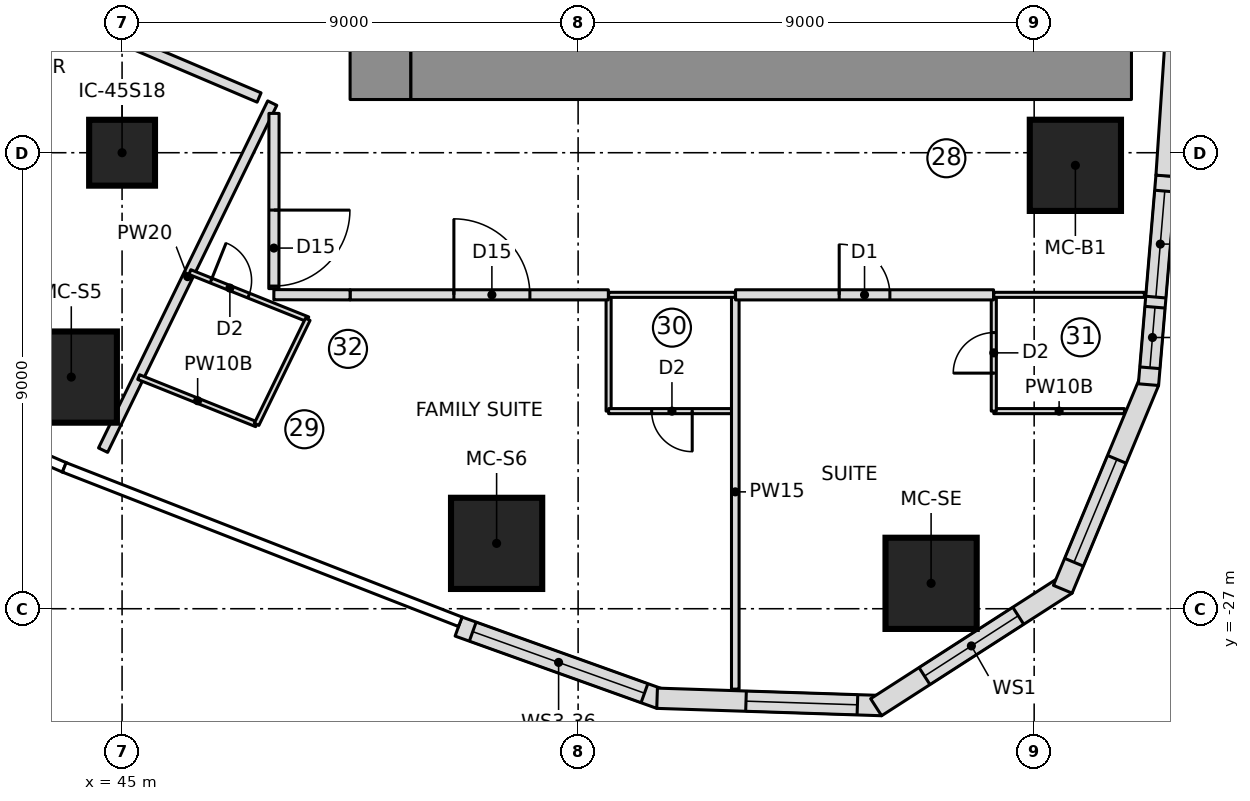
"""IFC4 building model, lengths in metres.
Left out: names, types, materials, properties, quantities, classifications, styles, units other than length and angle.
Written with IfcOpenShell. Run it as: python <this file> out.ifc"""

import sys

from ifc_helpers import new_model, si_unit, direction, frame, frame_2d, origin, origin_2d, place, context, subcontext, project, spatial, polyline, rectangle, outline, extrude, element, fill, save


model = new_model("IFC4")
c1 = context("Model", 3, precision=1e-05, world=origin(), true_north=direction((0.0, 1.0)))
c2 = subcontext(c1, "Body", "Model", "MODEL_VIEW")
j1 = project(units=[si_unit("LENGTHUNIT", "METRE"), si_unit("PLANEANGLEUNIT", "RADIAN")], contexts=[c1])
p1 = place(None, origin())
s1 = spatial("IfcSite", under=j1, at=p1, CompositionType="ELEMENT")
p2 = place(p1, origin())
s2 = spatial("IfcBuilding", under=s1, at=p2, CompositionType="ELEMENT")
p3 = place(p2, frame((0.0, 0.0, 53.8)))
s3 = spatial("IfcBuildingStorey", under=s2, at=p3, CompositionType="ELEMENT", Elevation=53.8)
p4 = place(p3, frame((50.1, -16.95, 0.0), z_axis=(0.0, 0.0, 1.0), x_axis=(0.0, 1.0, 0.0)))
e1 = element("IfcWall", 1, at=p4, inside=s3, PredefinedType="SHEAR", context=c2, shape_type="SweptSolid", body=[
    extrude(rectangle(XDim=10.3, YDim=1.2, at=frame_2d((5.15, 0.0))), origin(), (0.0, 0.0, 1.0), 3.55),
])
p5 = place(p4, frame((2.7, 0.0, 0.0)))
e2 = element("IfcOpeningElement", 2, at=p5, cuts=e1, PredefinedType="OPENING", context=c2, shape_type="SweptSolid", body=[
    extrude(rectangle(XDim=1.1, YDim=2.1, at=frame_2d((0.55, 1.05))), frame((0.0, 0.61, 0.0), z_axis=(0.0, -1.0, 0.0), x_axis=(1.0, 0.0, 0.0)), (0.0, 0.0, 1.0), 1.22),
])
p6 = place(p3, frame((50.7, -16.35, 0.0), z_axis=(0.0, 0.0, 1.0), x_axis=(1.0, 0.0, 0.0)))
e3 = element("IfcWall", 3, at=p6, inside=s3, PredefinedType="SHEAR", context=c2, shape_type="SweptSolid", body=[
    extrude(rectangle(XDim=14.22, YDim=1.2, at=frame_2d((7.11, 0.0))), origin(), (0.0, 0.0, 1.0), 3.55),
])
for number, where, z_axis, x_axis in (
    (4, (43.998, -22.428, 0.0), (0.0, 0.0, 1.0), (1.0, 0.0, 0.0)),
    (5, (52.392, -25.71, 0.0), (0.0, 0.0, 1.0), (1.0, 0.0, 0.0)),
    (6, (60.966, -26.499, 0.0), (0.0, 0.0, 1.0), (1.0, 0.0, 0.0)),
    (7, (63.813, -18.249, 0.0), (0.0, 0.0, 1.0), (1.0, 0.0, 0.0)),
):
    element("IfcColumn", number, at=place(p3, frame(where, z_axis=z_axis, x_axis=x_axis)), inside=s3, PredefinedType="COLUMN", context=c2, shape_type="SweptSolid", body=[
        extrude(rectangle(XDim=1.8, YDim=1.8, at=origin_2d()), origin(), (0.0, 0.0, 1.0), 3.55),
    ])
p7 = place(p3, frame((45.0, -18.0, 0.0), z_axis=(0.0, 0.0, 1.0), x_axis=(1.0, 0.0, 0.0)))
e8 = element("IfcColumn", 8, at=p7, inside=s3, PredefinedType="COLUMN", context=c2, shape_type="SweptSolid", body=[
    extrude(rectangle(XDim=1.3, YDim=1.3, at=origin_2d()), origin(), (0.0, 0.0, 1.0), 3.55),
])
p8 = place(p3, frame((51.64, -27.352, 0.0), z_axis=(0.0, 0.0, 1.0), x_axis=(0.941339752885, -0.337460323057, 0.0)))
e9 = element("IfcWall", 9, at=p8, inside=s3, PredefinedType="NOTDEFINED", context=c2, shape_type="SweptSolid", body=[
    extrude(outline(polyline([(0.0, -0.2), (4.228, -0.2), (4.165, 0.2), (0.0, 0.2), (0.0, -0.2)])), origin(), (0.0, 0.0, 1.0), 3.25),
])
p9 = place(p8, frame((0.298, 0.0, 0.9)))
e10 = element("IfcOpeningElement", 10, at=p9, cuts=e9, PredefinedType="OPENING", context=c2, shape_type="SweptSolid", body=[
    extrude(rectangle(XDim=3.6, YDim=1.8, at=frame_2d((1.8, 0.9))), frame((0.0, 0.21, 0.0), z_axis=(0.0, -1.0, 0.0), x_axis=(1.0, 0.0, 0.0)), (0.0, 0.0, 1.0), 0.42),
])
p10 = place(p3, frame((55.59, -28.768, 0.0), z_axis=(0.0, 0.0, 1.0), x_axis=(0.999463576228, -0.032749958686, 0.0)))
e11 = element("IfcWall", 11, at=p10, inside=s3, PredefinedType="NOTDEFINED", context=c2, shape_type="SweptSolid", body=[
    extrude(outline(polyline([(-0.031, -0.2), (4.409, -0.2), (4.284, 0.2), (0.031, 0.2), (-0.031, -0.2)])), origin(), (0.0, 0.0, 1.0), 3.25),
])
p11 = place(p10, frame((1.724, 0.0, 0.6)))
e12 = element("IfcOpeningElement", 12, at=p11, cuts=e11, PredefinedType="OPENING", context=c2, shape_type="SweptSolid", body=[
    extrude(outline(polyline([(0.0, 1.35), (0.084, 1.771), (0.322, 2.128), (0.679, 2.366), (1.1, 2.45), (1.521, 2.366), (1.878, 2.128), (2.116, 1.771), (2.2, 1.35), (2.2, 1.1), (2.116, 0.679), (1.878, 0.322), (1.521, 0.084), (1.1, 0.0), (0.679, 0.084), (0.322, 0.322), (0.084, 0.679), (0.0, 1.1), (0.0, 1.35)])), frame((0.0, 0.21, 0.0), z_axis=(0.0, -1.0, 0.0), x_axis=(1.0, 0.0, 0.0)), (0.0, 0.0, 1.0), 0.42),
])
p12 = place(p3, frame((59.934, -28.91, 0.0), z_axis=(0.0, 0.0, 1.0), x_axis=(0.840937468718, 0.541132307025, 0.0)))
e13 = element("IfcWall", 13, at=p12, inside=s3, PredefinedType="NOTDEFINED", context=c2, shape_type="SweptSolid", body=[
    extrude(outline(polyline([(-0.062, -0.2), (4.409, -0.2), (4.284, 0.2), (0.062, 0.2), (-0.062, -0.2)])), origin(), (0.0, 0.0, 1.0), 3.25),
])
p13 = place(p12, frame((1.073, 0.0, 0.6)))
e14 = element("IfcOpeningElement", 14, at=p13, cuts=e13, PredefinedType="OPENING", context=c2, shape_type="SweptSolid", body=[
    extrude(outline(polyline([(0.0, 1.35), (0.084, 1.771), (0.322, 2.128), (0.679, 2.366), (1.1, 2.45), (1.521, 2.366), (1.878, 2.128), (2.116, 1.771), (2.2, 1.35), (2.2, 1.1), (2.116, 0.679), (1.878, 0.322), (1.521, 0.084), (1.1, 0.0), (0.679, 0.084), (0.322, 0.322), (0.084, 0.679), (0.0, 1.1), (0.0, 1.35)])), frame((0.0, 0.21, 0.0), z_axis=(0.0, -1.0, 0.0), x_axis=(1.0, 0.0, 0.0)), (0.0, 0.0, 1.0), 0.42),
])
p14 = place(p3, frame((63.588, -26.558, 0.0), z_axis=(0.0, 0.0, 1.0), x_axis=(0.384372042685, 0.923178277908, 0.0)))
e15 = element("IfcWall", 15, at=p14, inside=s3, PredefinedType="NOTDEFINED", context=c2, shape_type="SweptSolid", body=[
    extrude(outline(polyline([(-0.062, -0.2), (4.377, -0.2), (4.314, 0.2), (0.062, 0.2), (-0.062, -0.2)])), origin(), (0.0, 0.0, 1.0), 3.25),
])
p15 = place(p14, frame((0.515, 0.0, 0.6)))
e16 = element("IfcOpeningElement", 16, at=p15, cuts=e15, PredefinedType="OPENING", context=c2, shape_type="SweptSolid", body=[
    extrude(outline(polyline([(0.0, 1.35), (0.084, 1.771), (0.322, 2.128), (0.679, 2.366), (1.1, 2.45), (1.521, 2.366), (1.878, 2.128), (2.116, 1.771), (2.2, 1.35), (2.2, 1.1), (2.116, 0.679), (1.878, 0.322), (1.521, 0.084), (1.1, 0.0), (0.679, 0.084), (0.322, 0.322), (0.084, 0.679), (0.0, 1.1), (0.0, 1.35)])), frame((0.0, 0.21, 0.0), z_axis=(0.0, -1.0, 0.0), x_axis=(1.0, 0.0, 0.0)), (0.0, 0.0, 1.0), 0.42),
])
p16 = place(p3, frame((65.259, -22.546, 0.0), z_axis=(0.0, 0.0, 1.0), x_axis=(0.083793550906, 0.996483136248, 0.0)))
e17 = element("IfcWall", 17, at=p16, inside=s3, PredefinedType="NOTDEFINED", context=c2, shape_type="SweptSolid", body=[
    extrude(outline(polyline([(-0.031, -0.2), (4.107, -0.2), (4.104, 0.2), (0.031, 0.2), (-0.031, -0.2)])), origin(), (0.0, 0.0, 1.0), 3.25),
])
p17 = place(p16, frame((0.302, 0.0, 0.9)))
e18 = element("IfcOpeningElement", 18, at=p17, cuts=e17, PredefinedType="OPENING", context=c2, shape_type="SweptSolid", body=[
    extrude(rectangle(XDim=1.2, YDim=1.8, at=frame_2d((0.6, 0.9))), frame((0.0, 0.21, 0.0), z_axis=(0.0, -1.0, 0.0), x_axis=(1.0, 0.0, 0.0)), (0.0, 0.0, 1.0), 0.42),
])
p18 = place(p16, frame((1.702, 0.0, 0.9)))
e19 = element("IfcOpeningElement", 19, at=p18, cuts=e17, PredefinedType="OPENING", context=c2, shape_type="SweptSolid", body=[
    extrude(rectangle(XDim=2.1, YDim=1.8, at=frame_2d((1.05, 0.9))), frame((0.0, 0.21, 0.0), z_axis=(0.0, -1.0, 0.0), x_axis=(1.0, 0.0, 0.0)), (0.0, 0.0, 1.0), 0.42),
])
p19 = place(p3, frame((65.603, -18.455, 0.0), z_axis=(0.0, 0.0, 1.0), x_axis=(0.067087430225, 0.997747100575, 0.0)))
e20 = element("IfcWall", 20, at=p19, inside=s3, PredefinedType="NOTDEFINED", context=c2, shape_type="SweptSolid", body=[
    extrude(outline(polyline([(-0.002, -0.2), (4.107, -0.2), (4.103, 0.2), (0.002, 0.2), (-0.002, -0.2)])), origin(), (0.0, 0.0, 1.0), 3.25),
])
p20 = place(p3, frame((54.602, -23.1, 0.0), z_axis=(0.0, 0.0, 1.0), x_axis=(0.0, 1.0, 0.0)))
e21 = element("IfcWall", 21, at=p20, inside=s3, PredefinedType="PARTITIONING", context=c2, shape_type="SweptSolid", body=[
    extrude(rectangle(XDim=2.3, YDim=0.1, at=frame_2d((1.15, 0.0))), origin(), (0.0, 0.0, 1.0), 3.25),
])
p21 = place(p3, frame((57.102, -23.1, 0.0), z_axis=(0.0, 0.0, 1.0), x_axis=(-1.0, 0.0, 0.0)))
e22 = element("IfcWall", 22, at=p21, inside=s3, PredefinedType="PARTITIONING", context=c2, shape_type="SweptSolid", body=[
    extrude(rectangle(XDim=2.5, YDim=0.1, at=frame_2d((1.25, 0.0))), origin(), (0.0, 0.0, 1.0), 3.25),
])
p22 = place(p21, frame((0.85, 0.0, 0.0)))
e23 = element("IfcOpeningElement", 23, at=p22, cuts=e22, PredefinedType="OPENING", context=c2, shape_type="SweptSolid", body=[
    extrude(rectangle(XDim=0.8, YDim=2.1, at=frame_2d((0.4, 1.05))), frame((0.0, 0.06, 0.0), z_axis=(0.0, -1.0, 0.0), x_axis=(1.0, 0.0, 0.0)), (0.0, 0.0, 1.0), 0.12),
])
p23 = place(p3, frame((64.781, -23.1, 0.0), z_axis=(0.0, 0.0, 1.0), x_axis=(-1.0, 0.0, 0.0)))
e24 = element("IfcWall", 24, at=p23, inside=s3, PredefinedType="PARTITIONING", context=c2, shape_type="SweptSolid", body=[
    extrude(rectangle(XDim=2.578, YDim=0.1, at=frame_2d((1.289, 0.0))), origin(), (0.0, 0.0, 1.0), 3.25),
])
p24 = place(p3, frame((62.203, -23.1, 0.0), z_axis=(0.0, 0.0, 1.0), x_axis=(0.0, 1.0, 0.0)))
e25 = element("IfcWall", 25, at=p24, inside=s3, PredefinedType="PARTITIONING", context=c2, shape_type="SweptSolid", body=[
    extrude(rectangle(XDim=2.3, YDim=0.1, at=frame_2d((1.15, 0.0))), origin(), (0.0, 0.0, 1.0), 3.25),
])
p25 = place(p24, frame((0.75, 0.0, 0.0)))
e26 = element("IfcOpeningElement", 26, at=p25, cuts=e25, PredefinedType="OPENING", context=c2, shape_type="SweptSolid", body=[
    extrude(rectangle(XDim=0.8, YDim=2.1, at=frame_2d((0.4, 1.05))), frame((0.0, 0.06, 0.0), z_axis=(0.0, -1.0, 0.0), x_axis=(1.0, 0.0, 0.0)), (0.0, 0.0, 1.0), 0.12),
])
p26 = place(p3, frame((57.102, -28.587, 0.0), z_axis=(0.0, 0.0, 1.0), x_axis=(0.0, 1.0, 0.0)))
e27 = element("IfcWall", 27, at=p26, inside=s3, PredefinedType="PARTITIONING", context=c2, shape_type="SweptSolid", body=[
    extrude(rectangle(XDim=7.787, YDim=0.15, at=frame_2d((3.894, 0.0))), origin(), (0.0, 0.0, 1.0), 3.25),
])
p27 = place(p3, frame((44.625, -23.87, 0.0), z_axis=(0.0, 0.0, 1.0), x_axis=(0.438207101073, 0.898874038211, 0.0)))
e28 = element("IfcWall", 28, at=p27, inside=s3, PredefinedType="PARTITIONING", context=c2, shape_type="SweptSolid", body=[
    extrude(rectangle(XDim=7.62, YDim=0.2, at=frame_2d((3.81, 0.0))), origin(), (0.0, 0.0, 1.0), 3.25),
])
p28 = place(p3, frame((47.655, -23.361, 0.0), z_axis=(0.0, 0.0, 1.0), x_axis=(-0.928288495333, 0.371860819975, 0.0)))
e29 = element("IfcWall", 29, at=p28, inside=s3, PredefinedType="PARTITIONING", context=c2, shape_type="SweptSolid", body=[
    extrude(rectangle(XDim=2.507, YDim=0.1, at=frame_2d((1.253, 0.0))), origin(), (0.0, 0.0, 1.0), 3.25),
])
p29 = place(p3, frame((46.338, -20.355, 0.0), z_axis=(0.0, 0.0, 1.0), x_axis=(0.928288495333, -0.371860819975, 0.0)))
e30 = element("IfcWall", 30, at=p29, inside=s3, PredefinedType="PARTITIONING", context=c2, shape_type="SweptSolid", body=[
    extrude(rectangle(XDim=2.507, YDim=0.1, at=frame_2d((1.253, 0.0))), origin(), (0.0, 0.0, 1.0), 3.25),
])
p30 = place(p29, frame((0.45, 0.0, 0.0)))
e31 = element("IfcOpeningElement", 31, at=p30, cuts=e30, PredefinedType="OPENING", context=c2, shape_type="SweptSolid", body=[
    extrude(rectangle(XDim=0.8, YDim=2.1, at=frame_2d((0.4, 1.05))), frame((0.0, 0.06, 0.0), z_axis=(0.0, -1.0, 0.0), x_axis=(1.0, 0.0, 0.0)), (0.0, 0.0, 1.0), 0.12),
])
p31 = place(p3, frame((48.665, -21.288, 0.0), z_axis=(0.0, 0.0, 1.0), x_axis=(-0.438171240168, -0.898891519756, 0.0)))
e32 = element("IfcWall", 32, at=p31, inside=s3, PredefinedType="PARTITIONING", context=c2, shape_type="SweptSolid", body=[
    extrude(rectangle(XDim=2.306, YDim=0.1, at=frame_2d((1.153, 0.0))), origin(), (0.0, 0.0, 1.0), 3.25),
])
p32 = place(p3, frame((49.5, -20.805, 0.0), z_axis=(0.0, 0.0, 1.0), x_axis=(1.0, 0.0, 0.0)))
e33 = element("IfcWall", 33, at=p32, inside=s3, PredefinedType="PARTITIONING", context=c2, shape_type="SweptSolid", body=[
    extrude(rectangle(XDim=5.097, YDim=0.2, at=frame_2d((2.548, 0.0))), origin(), (0.0, 0.0, 1.0), 3.25),
])
p33 = place(p32, frame((2.048, 0.0, 0.0)))
e34 = element("IfcOpeningElement", 34, at=p33, cuts=e33, PredefinedType="OPENING", context=c2, shape_type="SweptSolid", body=[
    extrude(rectangle(XDim=1.5, YDim=2.1, at=frame_2d((0.75, 1.05))), frame((0.0, 0.11, 0.0), z_axis=(0.0, -1.0, 0.0), x_axis=(1.0, 0.0, 0.0)), (0.0, 0.0, 1.0), 0.22),
])
p34 = place(p3, frame((57.107, -20.805, 0.0), z_axis=(0.0, 0.0, 1.0), x_axis=(1.0, 0.0, 0.0)))
e35 = element("IfcWall", 35, at=p34, inside=s3, PredefinedType="PARTITIONING", context=c2, shape_type="SweptSolid", body=[
    extrude(rectangle(XDim=5.092, YDim=0.2, at=frame_2d((2.546, 0.0))), origin(), (0.0, 0.0, 1.0), 3.25),
])
p35 = place(p34, frame((2.046, 0.0, 0.0)))
e36 = element("IfcOpeningElement", 36, at=p35, cuts=e35, PredefinedType="OPENING", context=c2, shape_type="SweptSolid", body=[
    extrude(rectangle(XDim=1.0, YDim=2.1, at=frame_2d((0.5, 1.05))), frame((0.0, 0.11, 0.0), z_axis=(0.0, -1.0, 0.0), x_axis=(1.0, 0.0, 0.0)), (0.0, 0.0, 1.0), 0.22),
])
p36 = place(p3, frame((54.602, -20.805, 0.0), z_axis=(0.0, 0.0, 1.0), x_axis=(1.0, 0.0, 0.0)))
e37 = element("IfcWall", 37, at=p36, inside=s3, PredefinedType="PARTITIONING", context=c2, shape_type="SweptSolid", body=[
    extrude(rectangle(XDim=2.5, YDim=0.1, at=frame_2d((1.25, 0.0))), origin(), (0.0, 0.0, 1.0), 3.25),
])
p37 = place(p3, frame((62.203, -20.805, 0.0), z_axis=(0.0, 0.0, 1.0), x_axis=(1.0, 0.0, 0.0)))
e38 = element("IfcWall", 38, at=p37, inside=s3, PredefinedType="PARTITIONING", context=c2, shape_type="SweptSolid", body=[
    extrude(rectangle(XDim=2.971, YDim=0.1, at=frame_2d((1.486, 0.0))), origin(), (0.0, 0.0, 1.0), 3.25),
])
p38 = place(p3, frame((40.223, -13.73, 0.0), z_axis=(0.0, 0.0, 1.0), x_axis=(0.920292261621, -0.391231585127, 0.0)))
e39 = element("IfcWall", 39, at=p38, inside=s3, PredefinedType="PARTITIONING", context=c2, shape_type="SweptSolid", body=[
    extrude(rectangle(XDim=8.129, YDim=0.2, at=frame_2d((4.064, 0.0))), origin(), (0.0, 0.0, 1.0), 3.25),
])
p39 = place(p38, frame((3.05, 0.0, 0.0)))
e40 = element("IfcOpeningElement", 40, at=p39, cuts=e39, PredefinedType="OPENING", context=c2, shape_type="SweptSolid", body=[
    extrude(rectangle(XDim=1.0, YDim=2.1, at=frame_2d((0.5, 1.05))), frame((0.0, 0.11, 0.0), z_axis=(0.0, -1.0, 0.0), x_axis=(1.0, 0.0, 0.0)), (0.0, 0.0, 1.0), 0.22),
])
p40 = place(p3, frame((47.995, -20.802, 0.0), z_axis=(0.0, 0.0, 1.0), x_axis=(0.999998104399, -0.001947099992, 0.0)))
e41 = element("IfcWall", 41, at=p40, inside=s3, PredefinedType="PARTITIONING", context=c2, shape_type="SweptSolid", body=[
    extrude(rectangle(XDim=1.505, YDim=0.2, at=frame_2d((0.752, 0.0))), origin(), (0.0, 0.0, 1.0), 3.25),
])
p41 = place(p3, frame((47.999, -17.224, 0.0), z_axis=(0.0, 0.0, 1.0), x_axis=(-0.000847217996, -0.999999641111, 0.0)))
e42 = element("IfcWall", 42, at=p41, inside=s3, PredefinedType="PARTITIONING", context=c2, shape_type="SweptSolid", body=[
    extrude(rectangle(XDim=3.458, YDim=0.2, at=frame_2d((1.729, 0.0))), origin(), (0.0, 0.0, 1.0), 3.25),
])
p42 = place(p41, frame((1.908, 0.0, 0.0)))
e43 = element("IfcOpeningElement", 43, at=p42, cuts=e42, PredefinedType="OPENING", context=c2, shape_type="SweptSolid", body=[
    extrude(rectangle(XDim=1.5, YDim=2.1, at=frame_2d((0.75, 1.05))), frame((0.0, 0.11, 0.0), z_axis=(0.0, -1.0, 0.0), x_axis=(1.0, 0.0, 0.0)), (0.0, 0.0, 1.0), 0.22),
])
p43 = place(p9, origin())
e44 = element("IfcWindow", 44, at=p43, inside=s3, PartitioningType="SINGLE_PANEL", PredefinedType="WINDOW", context=c2, shape_type="SweptSolid", body=[
    extrude(rectangle(XDim=3.6, YDim=1.8, at=frame_2d((1.8, 0.9))), frame((0.0, 0.17, 0.0), z_axis=(0.0, -1.0, 0.0), x_axis=(1.0, 0.0, 0.0)), (0.0, 0.0, 1.0), 0.06),
])
fill(e10, e44)
p44 = place(p11, origin())
e45 = element("IfcWindow", 45, at=p44, inside=s3, PartitioningType="SINGLE_PANEL", PredefinedType="WINDOW", context=c2, shape_type="SweptSolid", body=[
    extrude(outline(polyline([(0.0, 1.35), (0.084, 1.771), (0.322, 2.128), (0.679, 2.366), (1.1, 2.45), (1.521, 2.366), (1.878, 2.128), (2.116, 1.771), (2.2, 1.35), (2.2, 1.1), (2.116, 0.679), (1.878, 0.322), (1.521, 0.084), (1.1, 0.0), (0.679, 0.084), (0.322, 0.322), (0.084, 0.679), (0.0, 1.1), (0.0, 1.35)])), frame((0.0, 0.17, 0.0), z_axis=(0.0, -1.0, 0.0), x_axis=(1.0, 0.0, 0.0)), (0.0, 0.0, 1.0), 0.06),
])
fill(e12, e45)
p45 = place(p13, origin())
e46 = element("IfcWindow", 46, at=p45, inside=s3, PartitioningType="SINGLE_PANEL", PredefinedType="WINDOW", context=c2, shape_type="SweptSolid", body=[
    extrude(outline(polyline([(0.0, 1.35), (0.084, 1.771), (0.322, 2.128), (0.679, 2.366), (1.1, 2.45), (1.521, 2.366), (1.878, 2.128), (2.116, 1.771), (2.2, 1.35), (2.2, 1.1), (2.116, 0.679), (1.878, 0.322), (1.521, 0.084), (1.1, 0.0), (0.679, 0.084), (0.322, 0.322), (0.084, 0.679), (0.0, 1.1), (0.0, 1.35)])), frame((0.0, 0.17, 0.0), z_axis=(0.0, -1.0, 0.0), x_axis=(1.0, 0.0, 0.0)), (0.0, 0.0, 1.0), 0.06),
])
fill(e14, e46)
p46 = place(p15, origin())
e47 = element("IfcWindow", 47, at=p46, inside=s3, PartitioningType="SINGLE_PANEL", PredefinedType="WINDOW", context=c2, shape_type="SweptSolid", body=[
    extrude(outline(polyline([(0.0, 1.35), (0.084, 1.771), (0.322, 2.128), (0.679, 2.366), (1.1, 2.45), (1.521, 2.366), (1.878, 2.128), (2.116, 1.771), (2.2, 1.35), (2.2, 1.1), (2.116, 0.679), (1.878, 0.322), (1.521, 0.084), (1.1, 0.0), (0.679, 0.084), (0.322, 0.322), (0.084, 0.679), (0.0, 1.1), (0.0, 1.35)])), frame((0.0, 0.17, 0.0), z_axis=(0.0, -1.0, 0.0), x_axis=(1.0, 0.0, 0.0)), (0.0, 0.0, 1.0), 0.06),
])
fill(e16, e47)
p47 = place(p17, origin())
e48 = element("IfcWindow", 48, at=p47, inside=s3, PartitioningType="SINGLE_PANEL", PredefinedType="WINDOW", context=c2, shape_type="SweptSolid", body=[
    extrude(rectangle(XDim=1.2, YDim=1.8, at=frame_2d((0.6, 0.9))), frame((0.0, 0.17, 0.0), z_axis=(0.0, -1.0, 0.0), x_axis=(1.0, 0.0, 0.0)), (0.0, 0.0, 1.0), 0.06),
])
fill(e18, e48)
p48 = place(p18, origin())
e49 = element("IfcWindow", 49, at=p48, inside=s3, PartitioningType="SINGLE_PANEL", PredefinedType="WINDOW", context=c2, shape_type="SweptSolid", body=[
    extrude(rectangle(XDim=2.1, YDim=1.8, at=frame_2d((1.05, 0.9))), frame((0.0, 0.17, 0.0), z_axis=(0.0, -1.0, 0.0), x_axis=(1.0, 0.0, 0.0)), (0.0, 0.0, 1.0), 0.06),
])
fill(e19, e49)
p49 = place(p22, origin())
e50 = element("IfcDoor", 50, at=p49, inside=s3, OperationType="SINGLE_SWING_LEFT", PredefinedType="DOOR", context=c2, shape_type="SweptSolid", body=[
    extrude(rectangle(XDim=0.8, YDim=2.1, at=frame_2d((0.4, 1.05))), frame((0.0, 0.025, 0.0), z_axis=(0.0, -1.0, 0.0), x_axis=(1.0, 0.0, 0.0)), (0.0, 0.0, 1.0), 0.05),
])
fill(e23, e50)
p50 = place(p25, origin())
e51 = element("IfcDoor", 51, at=p50, inside=s3, OperationType="SINGLE_SWING_LEFT", PredefinedType="DOOR", context=c2, shape_type="SweptSolid", body=[
    extrude(rectangle(XDim=0.8, YDim=2.1, at=frame_2d((0.4, 1.05))), frame((0.0, 0.025, 0.0), z_axis=(0.0, -1.0, 0.0), x_axis=(1.0, 0.0, 0.0)), (0.0, 0.0, 1.0), 0.05),
])
fill(e26, e51)
p51 = place(p30, origin())
e52 = element("IfcDoor", 52, at=p51, inside=s3, OperationType="SINGLE_SWING_LEFT", PredefinedType="DOOR", context=c2, shape_type="SweptSolid", body=[
    extrude(rectangle(XDim=0.8, YDim=2.1, at=frame_2d((0.4, 1.05))), frame((0.0, 0.025, 0.0), z_axis=(0.0, -1.0, 0.0), x_axis=(1.0, 0.0, 0.0)), (0.0, 0.0, 1.0), 0.05),
])
fill(e31, e52)
p52 = place(p33, origin())
e53 = element("IfcDoor", 53, at=p52, inside=s3, OperationType="DOUBLE_DOOR_SINGLE_SWING", PredefinedType="DOOR", context=c2, shape_type="SweptSolid", body=[
    extrude(rectangle(XDim=1.5, YDim=2.1, at=frame_2d((0.75, 1.05))), frame((0.0, 0.025, 0.0), z_axis=(0.0, -1.0, 0.0), x_axis=(1.0, 0.0, 0.0)), (0.0, 0.0, 1.0), 0.05),
])
fill(e34, e53)
p53 = place(p35, origin())
e54 = element("IfcDoor", 54, at=p53, inside=s3, OperationType="SINGLE_SWING_LEFT", PredefinedType="DOOR", context=c2, shape_type="SweptSolid", body=[
    extrude(rectangle(XDim=1.0, YDim=2.1, at=frame_2d((0.5, 1.05))), frame((0.0, 0.025, 0.0), z_axis=(0.0, -1.0, 0.0), x_axis=(1.0, 0.0, 0.0)), (0.0, 0.0, 1.0), 0.05),
])
fill(e36, e54)
p54 = place(p42, origin())
e55 = element("IfcDoor", 55, at=p54, inside=s3, OperationType="DOUBLE_DOOR_SINGLE_SWING", PredefinedType="DOOR", context=c2, shape_type="SweptSolid", body=[
    extrude(rectangle(XDim=1.5, YDim=2.1, at=frame_2d((0.75, 1.05))), frame((0.0, 0.025, 0.0), z_axis=(0.0, -1.0, 0.0), x_axis=(1.0, 0.0, 0.0)), (0.0, 0.0, 1.0), 0.05),
])
fill(e43, e55)
save(model, sys.argv[1])
